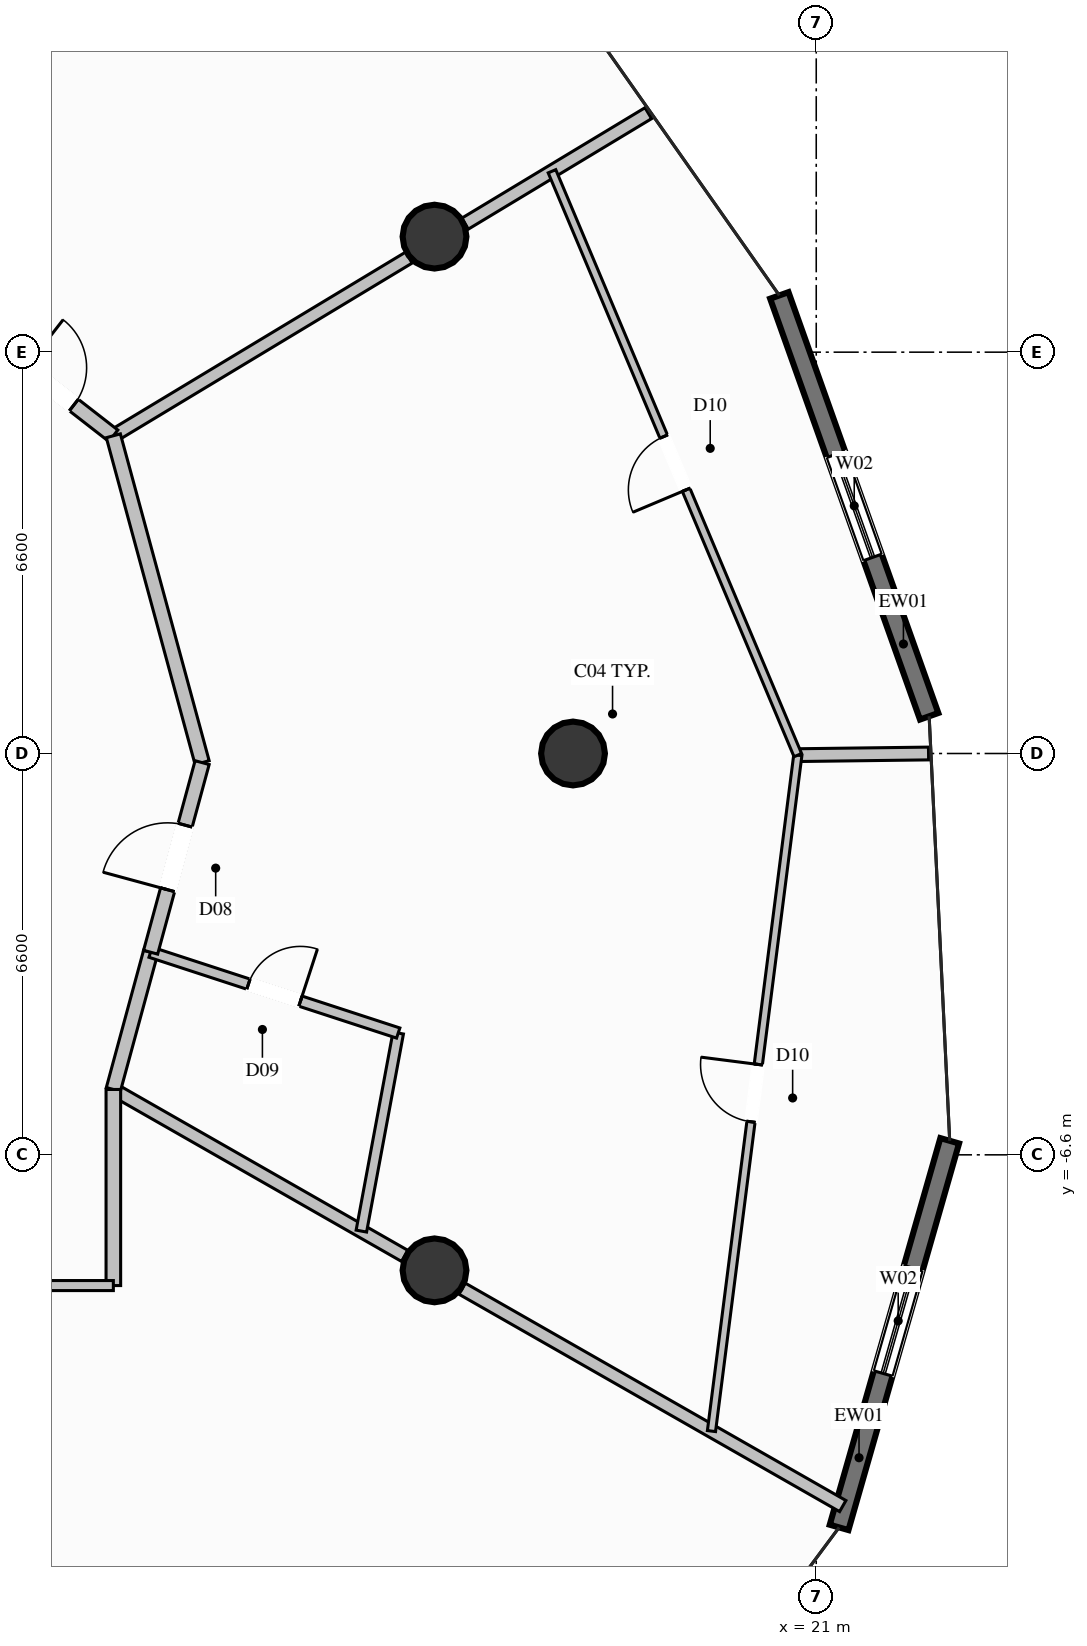
"""IFC4 building model, lengths in metres.
Left out: names, types, materials, properties, quantities, classifications, styles, units other than length and angle.
Written with IfcOpenShell. Run it as: python <this file> out.ifc"""

import sys

from ifc_helpers import new_model, si_unit, direction, frame, frame_2d, origin, origin_2d, place, context, subcontext, project, spatial, rectangle, circle, extrude, element, fill, save


model = new_model("IFC4")
c1 = context("Model", 3, precision=1e-05, world=origin(), true_north=direction((0.0, 1.0)))
c2 = subcontext(c1, "Body", "Model", "MODEL_VIEW")
j1 = project(units=[si_unit("LENGTHUNIT", "METRE"), si_unit("PLANEANGLEUNIT", "RADIAN")], contexts=[c1])
p1 = place(None, origin())
s1 = spatial("IfcSite", under=j1, at=p1, CompositionType="ELEMENT")
p2 = place(p1, origin())
s2 = spatial("IfcBuilding", under=s1, at=p2, CompositionType="ELEMENT")
p3 = place(p2, frame((0.0, 0.0, 153.0)))
s3 = spatial("IfcBuildingStorey", under=s2, at=p3, CompositionType="ELEMENT", Elevation=153.0)
for number, where, z_axis, x_axis in (
    (1, (17.0, 0.0, 0.0), (0.0, 0.0, 1.0), (1.0, 0.0, 0.0)),
    (2, (14.722, 8.5, 0.0), (0.0, 0.0, 1.0), (1.0, 0.0, 0.0)),
    (3, (14.722, -8.5, 0.0), (0.0, 0.0, 1.0), (1.0, 0.0, 0.0)),
):
    element("IfcColumn", number, at=place(p3, frame(where, z_axis=z_axis, x_axis=x_axis)), inside=s3, PredefinedType="COLUMN", context=c2, shape_type="SweptSolid", body=[
        extrude(circle(Radius=0.525, at=origin_2d()), origin(), (0.0, 0.0, 1.0), 3.6),
    ])
p4 = place(p3, frame((23.195, -6.369, 0.0), z_axis=(0.0, 0.0, 1.0), x_axis=(-0.275067292431, -0.961424976082, 0.0)))
e4 = element("IfcWall", 4, at=p4, inside=s3, PredefinedType="SOLIDWALL", context=c2, shape_type="SweptSolid", body=[
    extrude(rectangle(XDim=6.613, YDim=0.32, at=frame_2d((3.307, 0.0))), origin(), (0.0, 0.0, 1.0), 3.35),
])
p5 = place(p4, frame((2.18, 0.0, 0.35)))
e5 = element("IfcOpeningElement", 5, at=p5, cuts=e4, PredefinedType="OPENING", context=c2, shape_type="SweptSolid", body=[
    extrude(rectangle(XDim=1.8, YDim=2.6, at=frame_2d((0.9, 1.3))), frame((0.0, 0.17, 0.0), z_axis=(0.0, -1.0, 0.0), x_axis=(1.0, 0.0, 0.0)), (0.0, 0.0, 1.0), 0.34),
])
p6 = place(p3, frame((20.393, 7.533, 0.0), z_axis=(0.0, 0.0, 1.0), x_axis=(0.335384656609, -0.942081276808, 0.0)))
e6 = element("IfcWall", 6, at=p6, inside=s3, PredefinedType="SOLIDWALL", context=c2, shape_type="SweptSolid", body=[
    extrude(rectangle(XDim=7.346, YDim=0.32, at=frame_2d((3.673, 0.0))), origin(), (0.0, 0.0, 1.0), 3.35),
])
p7 = place(p6, frame((2.773, 0.0, 0.35)))
e7 = element("IfcOpeningElement", 7, at=p7, cuts=e6, PredefinedType="OPENING", context=c2, shape_type="SweptSolid", body=[
    extrude(rectangle(XDim=1.8, YDim=2.6, at=frame_2d((0.9, 1.3))), frame((0.0, 0.17, 0.0), z_axis=(0.0, -1.0, 0.0), x_axis=(1.0, 0.0, 0.0)), (0.0, 0.0, 1.0), 0.34),
])
p8 = place(p3, frame((9.44, 5.225, 0.0), z_axis=(0.0, 0.0, 1.0), x_axis=(0.856412995276, 0.516291372698, 0.0)))
e8 = element("IfcWall", 8, at=p8, inside=s3, PredefinedType="PARTITIONING", context=c2, shape_type="SweptSolid", body=[
    extrude(rectangle(XDim=5.675, YDim=0.21, at=frame_2d((2.837, 0.0))), origin(), (0.0, 0.0, 1.0), 2.791),
])
p9 = place(p3, frame((15.224, 8.713, 0.0), z_axis=(0.0, 0.0, 1.0), x_axis=(0.856389179425, 0.516330875857, 0.0)))
e9 = element("IfcWall", 9, at=p9, inside=s3, PredefinedType="PARTITIONING", context=c2, shape_type="SweptSolid", body=[
    extrude(rectangle(XDim=3.519, YDim=0.21, at=frame_2d((1.76, 0.0))), origin(), (0.0, 0.0, 1.0), 3.35),
])
p10 = place(p3, frame((9.44, -5.525, 0.0), z_axis=(0.0, 0.0, 1.0), x_axis=(0.868338411793, -0.495972179265, 0.0)))
e10 = element("IfcWall", 10, at=p10, inside=s3, PredefinedType="PARTITIONING", context=c2, shape_type="SweptSolid", body=[
    extrude(rectangle(XDim=5.519, YDim=0.21, at=frame_2d((2.759, 0.0))), origin(), (0.0, 0.0, 1.0), 2.791),
])
p11 = place(p3, frame((15.176, -8.801, 0.0), z_axis=(0.0, 0.0, 1.0), x_axis=(0.868374410063, -0.495909148885, 0.0)))
e11 = element("IfcWall", 11, at=p11, inside=s3, PredefinedType="PARTITIONING", context=c2, shape_type="SweptSolid", body=[
    extrude(rectangle(XDim=7.209, YDim=0.21, at=frame_2d((3.604, 0.0))), origin(), (0.0, 0.0, 1.0), 3.35),
])
p12 = place(p3, frame((7.35, 6.85, 0.0), z_axis=(0.0, 0.0, 1.0), x_axis=(0.789431664708, -0.613838453306, 0.0)))
e12 = element("IfcWall", 12, at=p12, inside=s3, PredefinedType="PARTITIONING", context=c2, shape_type="SweptSolid", body=[
    extrude(rectangle(XDim=2.647, YDim=0.24, at=frame_2d((1.324, 0.0))), origin(), (0.0, 0.0, 1.0), 3.35),
])
p13 = place(p12, frame((0.824, 0.0, 0.0)))
e13 = element("IfcOpeningElement", 13, at=p13, cuts=e12, PredefinedType="OPENING", context=c2, shape_type="SweptSolid", body=[
    extrude(rectangle(XDim=1.0, YDim=2.2, at=frame_2d((0.5, 1.1))), frame((0.0, 0.13, 0.0), z_axis=(0.0, -1.0, 0.0), x_axis=(1.0, 0.0, 0.0)), (0.0, 0.0, 1.0), 0.26),
])
p14 = place(p3, frame((9.44, -5.525, 0.0), z_axis=(0.0, 0.0, 1.0), x_axis=(0.262136756532, 0.965030735715, 0.0)))
e14 = element("IfcWall", 14, at=p14, inside=s3, PredefinedType="PARTITIONING", context=c2, shape_type="SweptSolid", body=[
    extrude(rectangle(XDim=2.339, YDim=0.24, at=frame_2d((1.169, 0.0))), origin(), (0.0, 0.0, 1.0), 3.35),
])
p15 = place(p3, frame((13.519, -7.854, 0.0), z_axis=(0.0, 0.0, 1.0), x_axis=(0.182904603297, 0.983130665829, 0.0)))
e15 = element("IfcWall", 15, at=p15, inside=s3, PredefinedType="PLUMBINGWALL", context=c2, shape_type="SweptSolid", body=[
    extrude(rectangle(XDim=3.313, YDim=0.175, at=frame_2d((1.656, 0.0))), origin(), (0.0, 0.0, 1.0), 3.35),
])
p16 = place(p3, frame((10.053, -3.268, 0.0), z_axis=(0.0, 0.0, 1.0), x_axis=(0.95065932904, -0.310236748484, 0.0)))
e16 = element("IfcWall", 16, at=p16, inside=s3, PredefinedType="PLUMBINGWALL", context=c2, shape_type="SweptSolid", body=[
    extrude(rectangle(XDim=4.283, YDim=0.175, at=frame_2d((2.142, 0.0))), origin(), (0.0, 0.0, 1.0), 3.35),
])
p17 = place(p16, frame((1.692, 0.0, 0.0)))
e17 = element("IfcOpeningElement", 17, at=p17, cuts=e16, PredefinedType="OPENING", context=c2, shape_type="SweptSolid", body=[
    extrude(rectangle(XDim=0.9, YDim=2.1, at=frame_2d((0.45, 1.05))), frame((0.0, 0.098, 0.0), z_axis=(0.0, -1.0, 0.0), x_axis=(1.0, 0.0, 0.0)), (0.0, 0.0, 1.0), 0.195),
])
p18 = place(p3, frame((20.697, -0.027, 0.0), z_axis=(0.0, 0.0, 1.0), x_axis=(0.999920565924, 0.012604040747, 0.0)))
e18 = element("IfcWall", 18, at=p18, inside=s3, PredefinedType="PARTITIONING", context=c2, shape_type="SweptSolid", body=[
    extrude(rectangle(XDim=2.15, YDim=0.21, at=frame_2d((1.075, 0.0))), origin(), (0.0, 0.0, 1.0), 3.35),
])
p19 = place(p3, frame((10.9, -0.15, 0.0), z_axis=(0.0, 0.0, 1.0), x_axis=(-0.262123261283, 0.965034401405, 0.0)))
e19 = element("IfcWall", 19, at=p19, inside=s3, PredefinedType="PARTITIONING", context=c2, shape_type="SweptSolid", body=[
    extrude(rectangle(XDim=5.57, YDim=0.24, at=frame_2d((2.785, 0.0))), origin(), (0.0, 0.0, 1.0), 2.985),
])
p20 = place(p3, frame((10.053, -3.268, 0.0), z_axis=(0.0, 0.0, 1.0), x_axis=(0.26211349372, 0.965037054423, 0.0)))
e20 = element("IfcWall", 20, at=p20, inside=s3, PredefinedType="PARTITIONING", context=c2, shape_type="SweptSolid", body=[
    extrude(rectangle(XDim=3.231, YDim=0.24, at=frame_2d((1.616, 0.0))), origin(), (0.0, 0.0, 1.0), 2.985),
])
p21 = place(p20, frame((1.065, 0.0, 0.0)))
e21 = element("IfcOpeningElement", 21, at=p21, cuts=e20, PredefinedType="OPENING", context=c2, shape_type="SweptSolid", body=[
    extrude(rectangle(XDim=1.1, YDim=2.3, at=frame_2d((0.55, 1.15))), frame((0.0, 0.13, 0.0), z_axis=(0.0, -1.0, 0.0), x_axis=(1.0, 0.0, 0.0)), (0.0, 0.0, 1.0), 0.26),
])
p22 = place(p3, frame((19.277, -11.143, 0.0), z_axis=(0.0, 0.0, 1.0), x_axis=(0.126707598937, 0.991940111283, 0.0)))
e22 = element("IfcWall", 22, at=p22, inside=s3, PredefinedType="PARTITIONING", context=c2, shape_type="SweptSolid", body=[
    extrude(rectangle(XDim=11.206, YDim=0.135, at=frame_2d((5.603, 0.0))), origin(), (0.0, 0.0, 1.0), 3.35),
])
p23 = place(p22, frame((5.128, 0.0, 0.0)))
e23 = element("IfcOpeningElement", 23, at=p23, cuts=e22, PredefinedType="OPENING", context=c2, shape_type="SweptSolid", body=[
    extrude(rectangle(XDim=0.95, YDim=2.1, at=frame_2d((0.475, 1.05))), frame((0.0, 0.078, 0.0), z_axis=(0.0, -1.0, 0.0), x_axis=(1.0, 0.0, 0.0)), (0.0, 0.0, 1.0), 0.155),
])
p24 = place(p3, frame((20.697, -0.027, 0.0), z_axis=(0.0, 0.0, 1.0), x_axis=(-0.388057000058, 0.921635375138, 0.0)))
e24 = element("IfcWall", 24, at=p24, inside=s3, PredefinedType="PARTITIONING", context=c2, shape_type="SweptSolid", body=[
    extrude(rectangle(XDim=10.418, YDim=0.135, at=frame_2d((5.209, 0.0))), origin(), (0.0, 0.0, 1.0), 3.35),
])
p25 = place(p24, frame((4.734, 0.0, 0.0)))
e25 = element("IfcOpeningElement", 25, at=p25, cuts=e24, PredefinedType="OPENING", context=c2, shape_type="SweptSolid", body=[
    extrude(rectangle(XDim=0.95, YDim=2.1, at=frame_2d((0.475, 1.05))), frame((0.0, 0.078, 0.0), z_axis=(0.0, -1.0, 0.0), x_axis=(1.0, 0.0, 0.0)), (0.0, 0.0, 1.0), 0.155),
])
p26 = place(p3, frame((9.44, -8.75, 0.0), z_axis=(0.0, 0.0, 1.0), x_axis=(0.0, 1.0, 0.0)))
e26 = element("IfcWall", 26, at=p26, inside=s3, PredefinedType="PARTITIONING", context=c2, shape_type="SweptSolid", body=[
    extrude(rectangle(XDim=3.225, YDim=0.24, at=frame_2d((1.613, 0.0))), origin(), (0.0, 0.0, 1.0), 3.35),
])
p27 = place(p3, frame((0.0, -8.75, 0.0), z_axis=(0.0, 0.0, 1.0), x_axis=(1.0, 0.0, 0.0)))
e27 = element("IfcWall", 27, at=p27, inside=s3, PredefinedType="PARTITIONING", context=c2, shape_type="SweptSolid", body=[
    extrude(rectangle(XDim=9.44, YDim=0.165, at=frame_2d((4.72, 0.0))), origin(), (0.0, 0.0, 1.0), 3.35),
])
p28 = place(p27, frame((4.245, 0.0, 0.0)))
e28 = element("IfcOpeningElement", 28, at=p28, cuts=e27, PredefinedType="OPENING", context=c2, shape_type="SweptSolid", body=[
    extrude(rectangle(XDim=0.95, YDim=2.1, at=frame_2d((0.475, 1.05))), frame((0.0, 0.093, 0.0), z_axis=(0.0, -1.0, 0.0), x_axis=(1.0, 0.0, 0.0)), (0.0, 0.0, 1.0), 0.185),
])
p29 = place(p5, origin())
e29 = element("IfcWindow", 29, at=p29, inside=s3, PartitioningType="SINGLE_PANEL", PredefinedType="WINDOW", context=c2, shape_type="SweptSolid", body=[
    extrude(rectangle(XDim=1.8, YDim=2.6, at=frame_2d((0.9, 1.3))), frame((0.0, 0.03, 0.0), z_axis=(0.0, -1.0, 0.0), x_axis=(1.0, 0.0, 0.0)), (0.0, 0.0, 1.0), 0.06),
])
fill(e5, e29)
p30 = place(p7, origin())
e30 = element("IfcWindow", 30, at=p30, inside=s3, PartitioningType="SINGLE_PANEL", PredefinedType="WINDOW", context=c2, shape_type="SweptSolid", body=[
    extrude(rectangle(XDim=1.8, YDim=2.6, at=frame_2d((0.9, 1.3))), frame((0.0, 0.03, 0.0), z_axis=(0.0, -1.0, 0.0), x_axis=(1.0, 0.0, 0.0)), (0.0, 0.0, 1.0), 0.06),
])
fill(e7, e30)
p31 = place(p13, origin())
e31 = element("IfcDoor", 31, at=p31, inside=s3, OperationType="SINGLE_SWING_LEFT", PredefinedType="DOOR", context=c2, shape_type="SweptSolid", body=[
    extrude(rectangle(XDim=1.0, YDim=2.2, at=frame_2d((0.5, 1.1))), frame((0.0, 0.025, 0.0), z_axis=(0.0, -1.0, 0.0), x_axis=(1.0, 0.0, 0.0)), (0.0, 0.0, 1.0), 0.05),
])
fill(e13, e31)
p32 = place(p17, origin())
e32 = element("IfcDoor", 32, at=p32, inside=s3, OperationType="SINGLE_SWING_RIGHT", PredefinedType="DOOR", context=c2, shape_type="SweptSolid", body=[
    extrude(rectangle(XDim=0.9, YDim=2.1, at=frame_2d((0.45, 1.05))), frame((0.0, 0.025, 0.0), z_axis=(0.0, -1.0, 0.0), x_axis=(1.0, 0.0, 0.0)), (0.0, 0.0, 1.0), 0.05),
])
fill(e17, e32)
p33 = place(p21, origin())
e33 = element("IfcDoor", 33, at=p33, inside=s3, OperationType="SINGLE_SWING_LEFT", PredefinedType="DOOR", context=c2, shape_type="SweptSolid", body=[
    extrude(rectangle(XDim=1.1, YDim=2.3, at=frame_2d((0.55, 1.15))), frame((0.0, 0.025, 0.0), z_axis=(0.0, -1.0, 0.0), x_axis=(1.0, 0.0, 0.0)), (0.0, 0.0, 1.0), 0.05),
])
fill(e21, e33)
p34 = place(p23, origin())
e34 = element("IfcDoor", 34, at=p34, inside=s3, OperationType="SINGLE_SWING_RIGHT", PredefinedType="DOOR", context=c2, shape_type="SweptSolid", body=[
    extrude(rectangle(XDim=0.95, YDim=2.1, at=frame_2d((0.475, 1.05))), frame((0.0, 0.025, 0.0), z_axis=(0.0, -1.0, 0.0), x_axis=(1.0, 0.0, 0.0)), (0.0, 0.0, 1.0), 0.05),
])
fill(e23, e34)
p35 = place(p25, origin())
e35 = element("IfcDoor", 35, at=p35, inside=s3, OperationType="SINGLE_SWING_LEFT", PredefinedType="DOOR", context=c2, shape_type="SweptSolid", body=[
    extrude(rectangle(XDim=0.95, YDim=2.1, at=frame_2d((0.475, 1.05))), frame((0.0, 0.025, 0.0), z_axis=(0.0, -1.0, 0.0), x_axis=(1.0, 0.0, 0.0)), (0.0, 0.0, 1.0), 0.05),
])
fill(e25, e35)
save(model, sys.argv[1])
